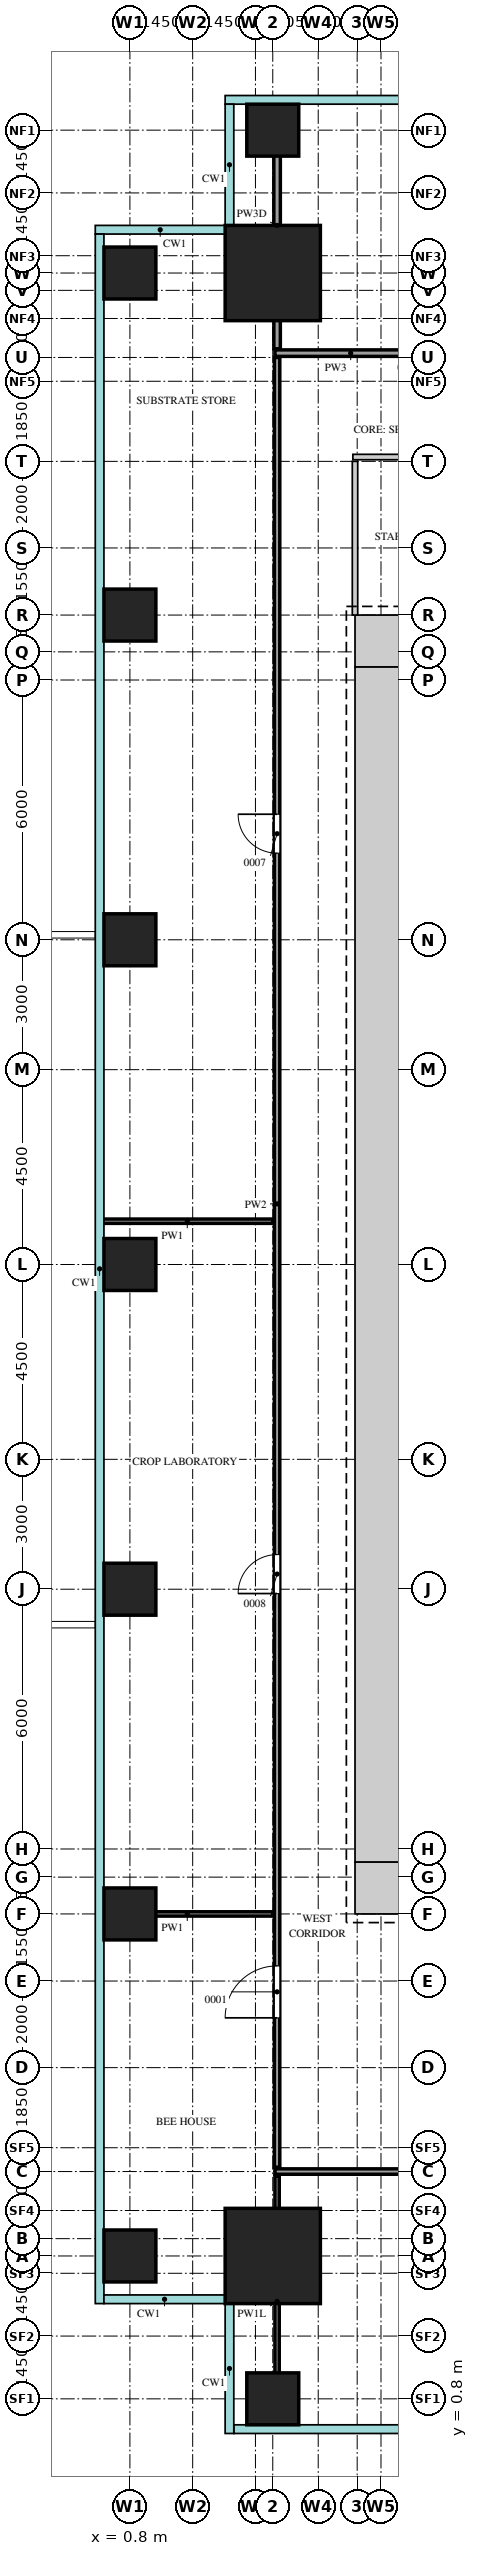
"""IFC4 building model, lengths in metres.
Left out: names, types, materials, properties, quantities, classifications, styles, units other than length and angle.
Written with IfcOpenShell. Run it as: python <this file> out.ifc"""

import sys

from ifc_helpers import new_model, si_unit, direction, frame, frame_2d, origin, origin_2d, place, context, subcontext, project, spatial, rectangle, extrude, source, transform, mapped, element, fill, save


model = new_model("IFC4")
c1 = context("Model", 3, precision=1e-05, world=origin(), true_north=direction((0.0, 1.0)))
c2 = subcontext(c1, "Body", "Model", "MODEL_VIEW")
j1 = project(units=[si_unit("LENGTHUNIT", "METRE"), si_unit("PLANEANGLEUNIT", "RADIAN")], contexts=[c1])
p1 = place(None, origin())
s1 = spatial("IfcSite", under=j1, at=p1, CompositionType="ELEMENT")
p2 = place(p1, origin())
s2 = spatial("IfcBuilding", under=s1, at=p2, CompositionType="ELEMENT")
p3 = place(p2, frame((0.0, 0.0, 82.5)))
s3 = spatial("IfcBuildingStorey", under=s2, at=p3, CompositionType="ELEMENT", Elevation=82.5)
m1 = source(origin(), c2, "Body", "SweptSolid", [
    extrude(rectangle(XDim=1.2, YDim=1.2, at=frame_2d((0.6, 0.0))), origin(), (0.0, 0.0, 1.0), 4.2),
])
for number, where, z_axis, x_axis in (
    (1, (6.0, 41.4, 0.0), (0.0, 0.0, 1.0), (1.0, 0.0, 0.0)),
    (2, (6.0, 12.6, 0.0), (0.0, 0.0, 1.0), (1.0, 0.0, 0.0)),
):
    element("IfcWall", number, at=place(p3, frame(where, z_axis=z_axis, x_axis=x_axis)), inside=s3, PredefinedType="SHEAR", context=c2, shape_type="MappedRepresentation", body=[
        mapped(m1, transform((0.0, 0.0, 0.0))),
    ])
m2 = source(origin(), c2, "Body", "SweptSolid", [
    extrude(rectangle(XDim=27.6, YDim=1.2, at=frame_2d((13.8, 0.0))), origin(), (0.0, 0.0, 1.0), 4.2),
])
p4 = place(p3, frame((6.6, 13.2, 0.0), z_axis=(0.0, 0.0, 1.0), x_axis=(0.0, 1.0, 0.0)))
e3 = element("IfcWall", 3, at=p4, inside=s3, PredefinedType="SHEAR", context=c2, shape_type="MappedRepresentation", body=[
    mapped(m2, transform((0.0, 0.0, 0.0))),
])
m3 = source(origin(), c2, "Body", "SweptSolid", [
    extrude(rectangle(XDim=2.2, YDim=2.2, at=origin_2d()), origin(), (0.0, 0.0, 1.0), 4.5),
])
for number, where, z_axis, x_axis in (
    (4, (4.1, 49.9, 0.0), (0.0, 0.0, 1.0), (1.0, 0.0, 0.0)),
    (5, (4.1, 4.1, 0.0), (0.0, 0.0, 1.0), (1.0, 0.0, 0.0)),
):
    element("IfcColumn", number, at=place(p3, frame(where, z_axis=z_axis, x_axis=x_axis)), inside=s3, PredefinedType="COLUMN", context=c2, shape_type="MappedRepresentation", body=[
        mapped(m3, transform((0.0, 0.0, 0.0))),
    ])
m4 = source(origin(), c2, "Body", "SweptSolid", [
    extrude(rectangle(XDim=1.2, YDim=1.2, at=origin_2d()), origin(), (0.0, 0.0, 1.0), 4.2),
])
for number, where, z_axis, x_axis in (
    (6, (4.1, 0.8, 0.0), (0.0, 0.0, 1.0), (1.0, 0.0, 0.0)),
    (7, (4.1, 53.2, 0.0), (0.0, 0.0, 1.0), (1.0, 0.0, 0.0)),
    (8, (0.8, 4.1, 0.0), (0.0, 0.0, 1.0), (1.0, 0.0, 0.0)),
    (9, (0.8, 12.0, 0.0), (0.0, 0.0, 1.0), (1.0, 0.0, 0.0)),
    (10, (0.8, 19.5, 0.0), (0.0, 0.0, 1.0), (1.0, 0.0, 0.0)),
    (11, (0.8, 27.0, 0.0), (0.0, 0.0, 1.0), (1.0, 0.0, 0.0)),
    (12, (0.8, 34.5, 0.0), (0.0, 0.0, 1.0), (1.0, 0.0, 0.0)),
    (13, (0.8, 42.0, 0.0), (0.0, 0.0, 1.0), (1.0, 0.0, 0.0)),
    (14, (0.8, 49.9, 0.0), (0.0, 0.0, 1.0), (1.0, 0.0, 0.0)),
):
    element("IfcColumn", number, at=place(p3, frame(where, z_axis=z_axis, x_axis=x_axis)), inside=s3, PredefinedType="COLUMN", context=c2, shape_type="MappedRepresentation", body=[
        mapped(m4, transform((0.0, 0.0, 0.0))),
    ])
m5 = source(origin(), c2, "Body", "SweptSolid", [
    extrude(rectangle(XDim=5.8, YDim=0.1, at=frame_2d((2.9, 0.0))), origin(), (0.0, 0.0, 1.0), 3.6),
])
p5 = place(p3, frame((4.2, 0.15, 0.0), z_axis=(0.0, 0.0, 1.0), x_axis=(0.0, 1.0, 0.0)))
e15 = element("IfcWall", 15, at=p5, inside=s3, PredefinedType="PARTITIONING", context=c2, shape_type="MappedRepresentation", body=[
    mapped(m5, transform((0.0, 0.0, 0.0))),
])
m6 = source(origin(), c2, "Body", "SweptSolid", [
    extrude(rectangle(XDim=22.15, YDim=0.125, at=frame_2d((11.075, 0.0))), origin(), (0.0, 0.0, 1.0), 4.3),
])
p6 = place(p3, frame((4.15, 6.05, 0.0), z_axis=(0.0, 0.0, 1.0), x_axis=(1.0, 0.0, 0.0)))
e16 = element("IfcWall", 16, at=p6, inside=s3, PredefinedType="PARTITIONING", context=c2, shape_type="MappedRepresentation", body=[
    mapped(m6, transform((0.0, 0.0, 0.0))),
])
m7 = source(origin(), c2, "Body", "SweptSolid", [
    extrude(rectangle(XDim=1.2, YDim=2.1, at=frame_2d((0.6, 1.05))), frame((0.0, 0.073, 0.0), z_axis=(0.0, -1.0, 0.0), x_axis=(1.0, 0.0, 0.0)), (0.0, 0.0, 1.0), 0.145),
])
p7 = place(p6, frame((9.2, 0.0, 0.0)))
e17 = element("IfcOpeningElement", 17, at=p7, cuts=e16, PredefinedType="OPENING", context=c2, shape_type="MappedRepresentation", body=[
    mapped(m7, transform((0.0, 0.0, 0.0))),
])
m8 = source(origin(), c2, "Body", "SweptSolid", [
    extrude(rectangle(XDim=41.8, YDim=0.125, at=frame_2d((20.9, 0.0))), origin(), (0.0, 0.0, 1.0), 4.3),
])
p8 = place(p3, frame((4.2, 6.15, 0.0), z_axis=(0.0, 0.0, 1.0), x_axis=(0.0, 1.0, 0.0)))
e18 = element("IfcWall", 18, at=p8, inside=s3, PredefinedType="PARTITIONING", context=c2, shape_type="MappedRepresentation", body=[
    mapped(m8, transform((0.0, 0.0, 0.0))),
])
p9 = place(p8, frame((3.45, 0.0, 0.0)))
e19 = element("IfcOpeningElement", 19, at=p9, cuts=e18, PredefinedType="OPENING", context=c2, shape_type="MappedRepresentation", body=[
    mapped(m7, transform((0.0, 0.0, 0.0))),
])
m9 = source(origin(), c2, "Body", "SweptSolid", [
    extrude(rectangle(XDim=0.9, YDim=2.1, at=frame_2d((0.45, 1.05))), frame((0.0, 0.073, 0.0), z_axis=(0.0, -1.0, 0.0), x_axis=(1.0, 0.0, 0.0)), (0.0, 0.0, 1.0), 0.145),
])
p10 = place(p8, frame((13.25, 0.0, 0.0)))
e20 = element("IfcOpeningElement", 20, at=p10, cuts=e18, PredefinedType="OPENING", context=c2, shape_type="MappedRepresentation", body=[
    mapped(m9, transform((0.0, 0.0, 0.0))),
])
p11 = place(p8, frame((30.35, 0.0, 0.0)))
e21 = element("IfcOpeningElement", 21, at=p11, cuts=e18, PredefinedType="OPENING", context=c2, shape_type="MappedRepresentation", body=[
    mapped(m9, transform((0.0, 0.0, 0.0))),
])
m10 = source(origin(), c2, "Body", "SweptSolid", [
    extrude(rectangle(XDim=3.95, YDim=0.1, at=frame_2d((1.975, 0.0))), origin(), (0.0, 0.0, 1.0), 4.3),
])
for number, where, z_axis, x_axis in (
    (22, (0.15, 12.0, 0.0), (0.0, 0.0, 1.0), (1.0, 0.0, 0.0)),
    (23, (0.15, 28.0, 0.0), (0.0, 0.0, 1.0), (1.0, 0.0, 0.0)),
):
    element("IfcWall", number, at=place(p3, frame(where, z_axis=z_axis, x_axis=x_axis)), inside=s3, PredefinedType="PARTITIONING", context=c2, shape_type="MappedRepresentation", body=[
        mapped(m10, transform((0.0, 0.0, 0.0))),
    ])
m11 = source(origin(), c2, "Body", "SweptSolid", [
    extrude(rectangle(XDim=3.55, YDim=0.125, at=frame_2d((1.775, 0.0))), origin(), (0.0, 0.0, 1.0), 4.3),
])
p12 = place(p3, frame((6.0, 42.0, 0.0), z_axis=(0.0, 0.0, 1.0), x_axis=(0.0, 1.0, 0.0)))
e24 = element("IfcWall", 24, at=p12, inside=s3, PredefinedType="PARTITIONING", context=c2, shape_type="MappedRepresentation", body=[
    mapped(m11, transform((0.0, 0.0, 0.0))),
])
m12 = source(origin(), c2, "Body", "SweptSolid", [
    extrude(rectangle(XDim=7.95, YDim=0.125, at=frame_2d((3.975, 0.0))), origin(), (0.0, 0.0, 1.0), 4.3),
])
p13 = place(p3, frame((5.95, 45.65, 0.0), z_axis=(0.0, 0.0, 1.0), x_axis=(1.0, 0.0, 0.0)))
e25 = element("IfcWall", 25, at=p13, inside=s3, PredefinedType="PARTITIONING", context=c2, shape_type="MappedRepresentation", body=[
    mapped(m12, transform((0.0, 0.0, 0.0))),
])
p14 = place(p13, frame((3.55, 0.0, 0.0)))
e26 = element("IfcOpeningElement", 26, at=p14, cuts=e25, PredefinedType="OPENING", context=c2, shape_type="MappedRepresentation", body=[
    mapped(m9, transform((0.0, 0.0, 0.0))),
])
m13 = source(origin(), c2, "Body", "SweptSolid", [
    extrude(rectangle(XDim=7.8, YDim=0.15, at=frame_2d((3.9, 0.0))), origin(), (0.0, 0.0, 1.0), 4.3),
])
p15 = place(p3, frame((4.15, 48.05, 0.0), z_axis=(0.0, 0.0, 1.0), x_axis=(1.0, 0.0, 0.0)))
e27 = element("IfcWall", 27, at=p15, inside=s3, PredefinedType="PARTITIONING", context=c2, shape_type="MappedRepresentation", body=[
    mapped(m13, transform((0.0, 0.0, 0.0))),
])
m14 = source(origin(), c2, "Body", "SweptSolid", [
    extrude(rectangle(XDim=0.9, YDim=2.1, at=frame_2d((0.45, 1.05))), frame((0.0, 0.085, 0.0), z_axis=(0.0, -1.0, 0.0), x_axis=(1.0, 0.0, 0.0)), (0.0, 0.0, 1.0), 0.17),
])
p16 = place(p15, frame((3.5, 0.0, 0.0)))
e28 = element("IfcOpeningElement", 28, at=p16, cuts=e27, PredefinedType="OPENING", context=c2, shape_type="MappedRepresentation", body=[
    mapped(m14, transform((0.0, 0.0, 0.0))),
])
m15 = source(origin(), c2, "Body", "SweptSolid", [
    extrude(rectangle(XDim=5.7, YDim=0.15, at=frame_2d((2.85, 0.0))), origin(), (0.0, 0.0, 1.0), 3.6),
])
p17 = place(p3, frame((4.2, 48.15, 0.0), z_axis=(0.0, 0.0, 1.0), x_axis=(0.0, 1.0, 0.0)))
e29 = element("IfcWall", 29, at=p17, inside=s3, PredefinedType="PARTITIONING", context=c2, shape_type="MappedRepresentation", body=[
    mapped(m15, transform((0.0, 0.0, 0.0))),
])
m16 = source(origin(), c2, "Body", "SweptSolid", [
    extrude(rectangle(XDim=1.2, YDim=2.1, at=frame_2d((0.6, 1.05))), frame((0.0, 0.025, 0.0), z_axis=(0.0, -1.0, 0.0), x_axis=(1.0, 0.0, 0.0)), (0.0, 0.0, 1.0), 0.05),
])
p18 = place(p9, origin())
e30 = element("IfcDoor", 30, at=p18, inside=s3, OperationType="SINGLE_SWING_RIGHT", PredefinedType="DOOR", context=c2, shape_type="MappedRepresentation", body=[
    mapped(m16, transform((0.0, 0.0, 0.0))),
])
fill(e19, e30)
m17 = source(origin(), c2, "Body", "SweptSolid", [
    extrude(rectangle(XDim=0.9, YDim=2.1, at=frame_2d((0.45, 1.05))), frame((0.0, 0.025, 0.0), z_axis=(0.0, -1.0, 0.0), x_axis=(1.0, 0.0, 0.0)), (0.0, 0.0, 1.0), 0.05),
])
p19 = place(p10, origin())
e31 = element("IfcDoor", 31, at=p19, inside=s3, OperationType="SINGLE_SWING_RIGHT", PredefinedType="DOOR", context=c2, shape_type="MappedRepresentation", body=[
    mapped(m17, transform((0.0, 0.0, 0.0))),
])
fill(e20, e31)
p20 = place(p11, origin())
e32 = element("IfcDoor", 32, at=p20, inside=s3, OperationType="SINGLE_SWING_LEFT", PredefinedType="DOOR", context=c2, shape_type="MappedRepresentation", body=[
    mapped(m17, transform((0.0, 0.0, 0.0))),
])
fill(e21, e32)
save(model, sys.argv[1])
